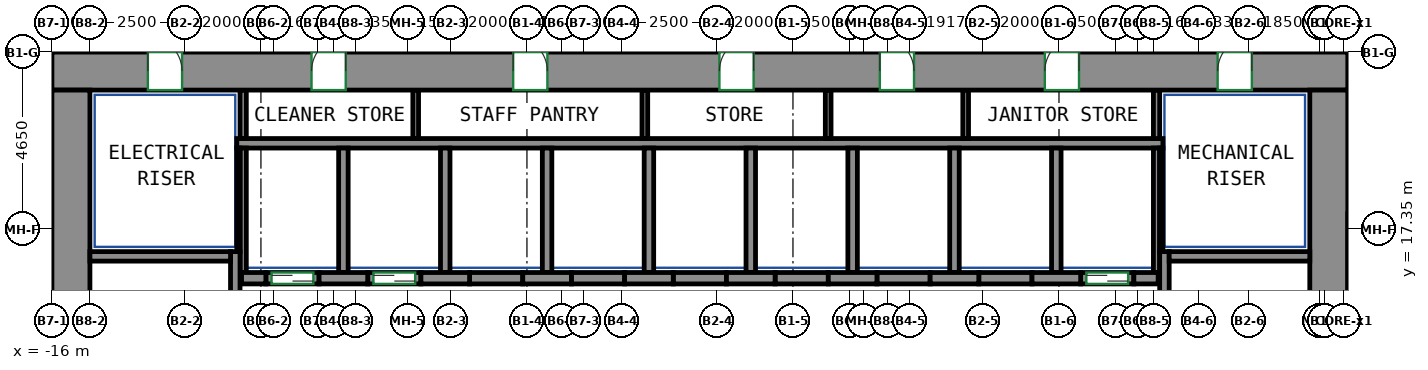
"""IFC4 building model, lengths in metres.
Left out: names, types, materials, properties, quantities, classifications, styles, units other than length and angle.
Written with IfcOpenShell. Run it as: python <this file> out.ifc"""

import sys

from ifc_helpers import new_model, si_unit, direction, frame, frame_2d, origin, place, context, subcontext, project, spatial, rectangle, extrude, source, transform, mapped, element, fill, save


model = new_model("IFC4")
c1 = context("Model", 3, precision=1e-05, world=origin(), true_north=direction((0.0, 1.0)))
c2 = subcontext(c1, "Body", "Model", "MODEL_VIEW")
j1 = project(units=[si_unit("LENGTHUNIT", "METRE"), si_unit("PLANEANGLEUNIT", "RADIAN")], contexts=[c1])
p1 = place(None, origin())
s1 = spatial("IfcSite", under=j1, at=p1, CompositionType="ELEMENT")
p2 = place(p1, origin())
s2 = spatial("IfcBuilding", under=s1, at=p2, CompositionType="ELEMENT")
p3 = place(p2, frame((0.0, 0.0, 35.0)))
s3 = spatial("IfcBuildingStorey", under=s2, at=p3, CompositionType="ELEMENT", Elevation=35.0)
m1 = source(origin(), c2, "Body", "SweptSolid", [
    extrude(rectangle(XDim=34.1, YDim=1.0, at=frame_2d((17.05, 0.0))), origin(), (0.0, 0.0, 1.0), 3.72),
])
p4 = place(p3, frame((-16.0, 21.5, 0.0), z_axis=(0.0, 0.0, 1.0), x_axis=(1.0, 0.0, 0.0)))
e1 = element("IfcWall", 1, at=p4, inside=s3, PredefinedType="SHEAR", context=c2, shape_type="MappedRepresentation", body=[
    mapped(m1, transform((0.0, 0.0, 0.0))),
])
p5 = place(p4, frame((6.831, 0.0, 0.0)))
e2 = element("IfcOpeningElement", 2, at=p5, cuts=e1, PredefinedType="OPENING", context=c2, shape_type="SweptSolid", body=[
    extrude(rectangle(XDim=0.9, YDim=2.1, at=frame_2d((0.45, 1.05))), frame((0.0, 0.51, 0.0), z_axis=(0.0, -1.0, 0.0), x_axis=(1.0, 0.0, 0.0)), (0.0, 0.0, 1.0), 1.02),
])
p6 = place(p4, frame((12.138, 0.0, 0.0)))
e3 = element("IfcOpeningElement", 3, at=p6, cuts=e1, PredefinedType="OPENING", context=c2, shape_type="SweptSolid", body=[
    extrude(rectangle(XDim=0.9, YDim=2.1, at=frame_2d((0.45, 1.05))), frame((0.0, 0.51, 0.0), z_axis=(0.0, -1.0, 0.0), x_axis=(1.0, 0.0, 0.0)), (0.0, 0.0, 1.0), 1.02),
])
p7 = place(p4, frame((17.565, 0.0, 0.0)))
e4 = element("IfcOpeningElement", 4, at=p7, cuts=e1, PredefinedType="OPENING", context=c2, shape_type="SweptSolid", body=[
    extrude(rectangle(XDim=0.9, YDim=2.1, at=frame_2d((0.45, 1.05))), frame((0.0, 0.51, 0.0), z_axis=(0.0, -1.0, 0.0), x_axis=(1.0, 0.0, 0.0)), (0.0, 0.0, 1.0), 1.02),
])
p8 = place(p4, frame((21.786, 0.0, 0.0)))
e5 = element("IfcOpeningElement", 5, at=p8, cuts=e1, PredefinedType="OPENING", context=c2, shape_type="SweptSolid", body=[
    extrude(rectangle(XDim=0.9, YDim=2.1, at=frame_2d((0.45, 1.05))), frame((0.0, 0.51, 0.0), z_axis=(0.0, -1.0, 0.0), x_axis=(1.0, 0.0, 0.0)), (0.0, 0.0, 1.0), 1.02),
])
p9 = place(p4, frame((26.127, 0.0, 0.0)))
e6 = element("IfcOpeningElement", 6, at=p9, cuts=e1, PredefinedType="OPENING", context=c2, shape_type="SweptSolid", body=[
    extrude(rectangle(XDim=0.9, YDim=2.1, at=frame_2d((0.45, 1.05))), frame((0.0, 0.51, 0.0), z_axis=(0.0, -1.0, 0.0), x_axis=(1.0, 0.0, 0.0)), (0.0, 0.0, 1.0), 1.02),
])
p10 = place(p4, frame((2.525, 0.0, 0.0)))
e7 = element("IfcOpeningElement", 7, at=p10, cuts=e1, PredefinedType="OPENING", context=c2, shape_type="SweptSolid", body=[
    extrude(rectangle(XDim=0.9, YDim=2.1, at=frame_2d((0.45, 1.05))), frame((0.0, 0.51, 0.0), z_axis=(0.0, -1.0, 0.0), x_axis=(1.0, 0.0, 0.0)), (0.0, 0.0, 1.0), 1.02),
])
p11 = place(p4, frame((30.675, 0.0, 0.0)))
e8 = element("IfcOpeningElement", 8, at=p11, cuts=e1, PredefinedType="OPENING", context=c2, shape_type="SweptSolid", body=[
    extrude(rectangle(XDim=0.9, YDim=2.1, at=frame_2d((0.45, 1.05))), frame((0.0, 0.51, 0.0), z_axis=(0.0, -1.0, 0.0), x_axis=(1.0, 0.0, 0.0)), (0.0, 0.0, 1.0), 1.02),
])
m2 = source(origin(), c2, "Body", "SweptSolid", [
    extrude(rectangle(XDim=12.0, YDim=1.0, at=frame_2d((6.0, 0.0))), origin(), (0.0, 0.0, 1.0), 3.72),
])
for number, where, z_axis, x_axis in (
    (9, (-15.5, 9.0, 0.0), (0.0, 0.0, 1.0), (0.0, 1.0, 0.0)),
    (10, (17.6, 9.0, 0.0), (0.0, 0.0, 1.0), (0.0, 1.0, 0.0)),
):
    element("IfcWall", number, at=place(p3, frame(where, z_axis=z_axis, x_axis=x_axis)), inside=s3, PredefinedType="SHEAR", context=c2, shape_type="MappedRepresentation", body=[
        mapped(m2, transform((0.0, 0.0, 0.0))),
    ])
m3 = source(origin(), c2, "Body", "SweptSolid", [
    extrude(rectangle(XDim=7.75, YDim=0.25, at=frame_2d((3.875, 0.0))), origin(), (0.0, 0.0, 1.0), 3.72),
])
p12 = place(p3, frame((-11.175, 9.0, 0.0), z_axis=(0.0, 0.0, 1.0), x_axis=(0.0, 1.0, 0.0)))
e11 = element("IfcWall", 11, at=p12, inside=s3, PredefinedType="SHEAR", context=c2, shape_type="MappedRepresentation", body=[
    mapped(m3, transform((0.0, 0.0, 0.0))),
])
m4 = source(origin(), c2, "Body", "SweptSolid", [
    extrude(rectangle(XDim=3.7, YDim=0.25, at=frame_2d((1.85, 0.0))), origin(), (0.0, 0.0, 1.0), 3.72),
])
p13 = place(p3, frame((-15.0, 16.625, 0.0), z_axis=(0.0, 0.0, 1.0), x_axis=(1.0, 0.0, 0.0)))
e12 = element("IfcWall", 12, at=p13, inside=s3, PredefinedType="SHEAR", context=c2, shape_type="MappedRepresentation", body=[
    mapped(m4, transform((0.0, 0.0, 0.0))),
])
p14 = place(p3, frame((13.275, 9.0, 0.0), z_axis=(0.0, 0.0, 1.0), x_axis=(0.0, 1.0, 0.0)))
e13 = element("IfcWall", 13, at=p14, inside=s3, PredefinedType="SHEAR", context=c2, shape_type="MappedRepresentation", body=[
    mapped(m3, transform((0.0, 0.0, 0.0))),
])
m5 = source(origin(), c2, "Body", "SweptSolid", [
    extrude(rectangle(XDim=3.7, YDim=0.25, at=frame_2d((1.85, 0.0))), origin(), (0.0, 0.0, 1.0), 3.72),
])
p15 = place(p3, frame((13.4, 16.625, 0.0), z_axis=(0.0, 0.0, 1.0), x_axis=(1.0, 0.0, 0.0)))
e14 = element("IfcWall", 14, at=p15, inside=s3, PredefinedType="SHEAR", context=c2, shape_type="MappedRepresentation", body=[
    mapped(m5, transform((0.0, 0.0, 0.0))),
])
m6 = source(origin(), c2, "Body", "SweptSolid", [
    extrude(rectangle(XDim=0.64, YDim=0.3, at=frame_2d((0.32, 0.0))), origin(), (0.0, 0.0, 1.0), 3.72),
])
p16 = place(p3, frame((-11.01, 16.05, 0.0), z_axis=(0.0, 0.0, 1.0), x_axis=(1.0, 0.0, 0.0)))
e15 = element("IfcWall", 15, at=p16, inside=s3, PredefinedType="SHEAR", context=c2, shape_type="MappedRepresentation", body=[
    mapped(m6, transform((0.0, 0.0, 0.0))),
])
m7 = source(origin(), c2, "Body", "SweptSolid", [
    extrude(rectangle(XDim=1.28, YDim=0.3, at=frame_2d((0.64, 0.0))), origin(), (0.0, 0.0, 1.0), 3.72),
])
for number, where, z_axis, x_axis in (
    (16, (-8.97, 16.05, 0.0), (0.0, 0.0, 1.0), (1.0, 0.0, 0.0)),
    (17, (-6.29, 16.05, 0.0), (0.0, 0.0, 1.0), (1.0, 0.0, 0.0)),
    (18, (-3.61, 16.05, 0.0), (0.0, 0.0, 1.0), (1.0, 0.0, 0.0)),
    (19, (-0.93, 16.05, 0.0), (0.0, 0.0, 1.0), (1.0, 0.0, 0.0)),
    (20, (1.75, 16.05, 0.0), (0.0, 0.0, 1.0), (1.0, 0.0, 0.0)),
    (21, (4.43, 16.05, 0.0), (0.0, 0.0, 1.0), (1.0, 0.0, 0.0)),
):
    element("IfcWall", number, at=place(p3, frame(where, z_axis=z_axis, x_axis=x_axis)), inside=s3, PredefinedType="SHEAR", context=c2, shape_type="MappedRepresentation", body=[
        mapped(m7, transform((0.0, 0.0, 0.0))),
    ])
m8 = source(origin(), c2, "Body", "SweptSolid", [
    extrude(rectangle(XDim=1.28, YDim=0.3, at=frame_2d((0.64, 0.0))), origin(), (0.0, 0.0, 1.0), 3.72),
])
p17 = place(p3, frame((7.11, 16.05, 0.0), z_axis=(0.0, 0.0, 1.0), x_axis=(1.0, 0.0, 0.0)))
e22 = element("IfcWall", 22, at=p17, inside=s3, PredefinedType="SHEAR", context=c2, shape_type="MappedRepresentation", body=[
    mapped(m8, transform((0.0, 0.0, 0.0))),
])
p18 = place(p3, frame((9.79, 16.05, 0.0), z_axis=(0.0, 0.0, 1.0), x_axis=(1.0, 0.0, 0.0)))
e23 = element("IfcWall", 23, at=p18, inside=s3, PredefinedType="SHEAR", context=c2, shape_type="MappedRepresentation", body=[
    mapped(m7, transform((0.0, 0.0, 0.0))),
])
m9 = source(origin(), c2, "Body", "SweptSolid", [
    extrude(rectangle(XDim=0.64, YDim=0.3, at=frame_2d((0.32, 0.0))), origin(), (0.0, 0.0, 1.0), 3.72),
])
p19 = place(p3, frame((12.47, 16.05, 0.0), z_axis=(0.0, 0.0, 1.0), x_axis=(1.0, 0.0, 0.0)))
e24 = element("IfcWall", 24, at=p19, inside=s3, PredefinedType="SHEAR", context=c2, shape_type="MappedRepresentation", body=[
    mapped(m9, transform((0.0, 0.0, 0.0))),
])
m10 = source(origin(), c2, "Body", "SweptSolid", [
    extrude(rectangle(XDim=1.4, YDim=0.3, at=frame_2d((0.7, 0.0))), origin(), (0.0, 0.0, 1.0), 3.72),
])
p20 = place(p3, frame((11.07, 16.05, 0.0), z_axis=(0.0, 0.0, 1.0), x_axis=(1.0, 0.0, 0.0)))
e25 = element("IfcWall", 25, at=p20, inside=s3, PredefinedType="PARTITIONING", context=c2, shape_type="MappedRepresentation", body=[
    mapped(m10, transform((0.0, 0.0, 0.0))),
])
p21 = place(p20, frame((0.15, 0.0, 0.0)))
e26 = element("IfcOpeningElement", 26, at=p21, cuts=e25, PredefinedType="OPENING", context=c2, shape_type="SweptSolid", body=[
    extrude(rectangle(XDim=1.1, YDim=2.1, at=frame_2d((0.55, 1.05))), frame((0.0, 0.16, 0.0), z_axis=(0.0, -1.0, 0.0), x_axis=(1.0, 0.0, 0.0)), (0.0, 0.0, 1.0), 0.32),
])
m11 = source(origin(), c2, "Body", "SweptSolid", [
    extrude(rectangle(XDim=1.4, YDim=0.3, at=frame_2d((0.7, 0.0))), origin(), (0.0, 0.0, 1.0), 3.72),
])
p22 = place(p3, frame((-10.37, 16.05, 0.0), z_axis=(0.0, 0.0, 1.0), x_axis=(1.0, 0.0, 0.0)))
e27 = element("IfcWall", 27, at=p22, inside=s3, PredefinedType="PARTITIONING", context=c2, shape_type="MappedRepresentation", body=[
    mapped(m11, transform((0.0, 0.0, 0.0))),
])
p23 = place(p22, frame((0.15, 0.0, 0.0)))
e28 = element("IfcOpeningElement", 28, at=p23, cuts=e27, PredefinedType="OPENING", context=c2, shape_type="SweptSolid", body=[
    extrude(rectangle(XDim=1.1, YDim=2.1, at=frame_2d((0.55, 1.05))), frame((0.0, 0.16, 0.0), z_axis=(0.0, -1.0, 0.0), x_axis=(1.0, 0.0, 0.0)), (0.0, 0.0, 1.0), 0.32),
])
p24 = place(p3, frame((-7.69, 16.05, 0.0), z_axis=(0.0, 0.0, 1.0), x_axis=(1.0, 0.0, 0.0)))
e29 = element("IfcWall", 29, at=p24, inside=s3, PredefinedType="PARTITIONING", context=c2, shape_type="MappedRepresentation", body=[
    mapped(m10, transform((0.0, 0.0, 0.0))),
])
p25 = place(p24, frame((0.15, 0.0, 0.0)))
e30 = element("IfcOpeningElement", 30, at=p25, cuts=e29, PredefinedType="OPENING", context=c2, shape_type="SweptSolid", body=[
    extrude(rectangle(XDim=1.1, YDim=2.1, at=frame_2d((0.55, 1.05))), frame((0.0, 0.16, 0.0), z_axis=(0.0, -1.0, 0.0), x_axis=(1.0, 0.0, 0.0)), (0.0, 0.0, 1.0), 0.32),
])
p26 = place(p3, frame((-5.01, 16.05, 0.0), z_axis=(0.0, 0.0, 1.0), x_axis=(1.0, 0.0, 0.0)))
e31 = element("IfcWall", 31, at=p26, inside=s3, PredefinedType="PARTITIONING", context=c2, shape_type="MappedRepresentation", body=[
    mapped(m10, transform((0.0, 0.0, 0.0))),
])
p27 = place(p3, frame((-2.33, 16.05, 0.0), z_axis=(0.0, 0.0, 1.0), x_axis=(1.0, 0.0, 0.0)))
e32 = element("IfcWall", 32, at=p27, inside=s3, PredefinedType="PARTITIONING", context=c2, shape_type="MappedRepresentation", body=[
    mapped(m11, transform((0.0, 0.0, 0.0))),
])
for number, where, z_axis, x_axis in (
    (33, (0.35, 16.05, 0.0), (0.0, 0.0, 1.0), (1.0, 0.0, 0.0)),
    (34, (3.03, 16.05, 0.0), (0.0, 0.0, 1.0), (1.0, 0.0, 0.0)),
):
    element("IfcWall", number, at=place(p3, frame(where, z_axis=z_axis, x_axis=x_axis)), inside=s3, PredefinedType="PARTITIONING", context=c2, shape_type="MappedRepresentation", body=[
        mapped(m10, transform((0.0, 0.0, 0.0))),
    ])
for number, where, z_axis, x_axis in (
    (35, (5.71, 16.05, 0.0), (0.0, 0.0, 1.0), (1.0, 0.0, 0.0)),
    (36, (8.39, 16.05, 0.0), (0.0, 0.0, 1.0), (1.0, 0.0, 0.0)),
):
    element("IfcWall", number, at=place(p3, frame(where, z_axis=z_axis, x_axis=x_axis)), inside=s3, PredefinedType="PARTITIONING", context=c2, shape_type="MappedRepresentation", body=[
        mapped(m11, transform((0.0, 0.0, 0.0))),
    ])
m12 = source(origin(), c2, "Body", "SweptSolid", [
    extrude(rectangle(XDim=24.37, YDim=0.25, at=frame_2d((12.185, 0.0))), origin(), (0.0, 0.0, 1.0), 3.72),
])
p28 = place(p3, frame((-11.135, 19.6, 0.0), z_axis=(0.0, 0.0, 1.0), x_axis=(1.0, 0.0, 0.0)))
e37 = element("IfcWall", 37, at=p28, inside=s3, PredefinedType="PARTITIONING", context=c2, shape_type="MappedRepresentation", body=[
    mapped(m12, transform((0.0, 0.0, 0.0))),
])
m13 = source(origin(), c2, "Body", "SweptSolid", [
    extrude(rectangle(XDim=3.275, YDim=0.165, at=frame_2d((1.638, 0.0))), origin(), (0.0, 0.0, 1.0), 3.72),
])
p29 = place(p3, frame((13.067, 16.2, 0.0), z_axis=(0.0, 0.0, 1.0), x_axis=(0.0, 1.0, 0.0)))
e38 = element("IfcWall", 38, at=p29, inside=s3, PredefinedType="PARTITIONING", context=c2, shape_type="MappedRepresentation", body=[
    mapped(m13, transform((0.0, 0.0, 0.0))),
])
m14 = source(origin(), c2, "Body", "SweptSolid", [
    extrude(rectangle(XDim=1.275, YDim=0.165, at=frame_2d((0.637, 0.0))), origin(), (0.0, 0.0, 1.0), 3.72),
])
p30 = place(p3, frame((13.067, 19.725, 0.0), z_axis=(0.0, 0.0, 1.0), x_axis=(0.0, 1.0, 0.0)))
e39 = element("IfcWall", 39, at=p30, inside=s3, PredefinedType="PARTITIONING", context=c2, shape_type="MappedRepresentation", body=[
    mapped(m14, transform((0.0, 0.0, 0.0))),
])
p31 = place(p3, frame((-10.968, 16.2, 0.0), z_axis=(0.0, 0.0, 1.0), x_axis=(0.0, 1.0, 0.0)))
e40 = element("IfcWall", 40, at=p31, inside=s3, PredefinedType="PARTITIONING", context=c2, shape_type="MappedRepresentation", body=[
    mapped(m13, transform((0.0, 0.0, 0.0))),
])
p32 = place(p3, frame((-10.968, 19.725, 0.0), z_axis=(0.0, 0.0, 1.0), x_axis=(0.0, 1.0, 0.0)))
e41 = element("IfcWall", 41, at=p32, inside=s3, PredefinedType="PARTITIONING", context=c2, shape_type="MappedRepresentation", body=[
    mapped(m14, transform((0.0, 0.0, 0.0))),
])
m15 = source(origin(), c2, "Body", "SweptSolid", [
    extrude(rectangle(XDim=3.275, YDim=0.25, at=frame_2d((1.638, 0.0))), origin(), (0.0, 0.0, 1.0), 3.72),
])
p33 = place(p3, frame((10.43, 16.2, 0.0), z_axis=(0.0, 0.0, 1.0), x_axis=(0.0, 1.0, 0.0)))
e42 = element("IfcWall", 42, at=p33, inside=s3, PredefinedType="PARTITIONING", context=c2, shape_type="MappedRepresentation", body=[
    mapped(m15, transform((0.0, 0.0, 0.0))),
])
m16 = source(origin(), c2, "Body", "SweptSolid", [
    extrude(rectangle(XDim=2.725, YDim=0.085, at=frame_2d((1.363, 0.0))), origin(), (0.0, 0.0, 1.0), 3.72),
])
p34 = place(p3, frame((13.192, 16.75, 0.0), z_axis=(0.0, 0.0, 1.0), x_axis=(0.0, 1.0, 0.0)))
e43 = element("IfcWall", 43, at=p34, inside=s3, PredefinedType="PARTITIONING", context=c2, shape_type="MappedRepresentation", body=[
    mapped(m16, transform((0.0, 0.0, 0.0))),
])
for number, where, z_axis, x_axis in (
    (44, (2.39, 16.2, 0.0), (0.0, 0.0, 1.0), (0.0, 1.0, 0.0)),
    (45, (5.07, 16.2, 0.0), (0.0, 0.0, 1.0), (0.0, 1.0, 0.0)),
    (46, (7.75, 16.2, 0.0), (0.0, 0.0, 1.0), (0.0, 1.0, 0.0)),
    (47, (-0.29, 16.2, 0.0), (0.0, 0.0, 1.0), (0.0, 1.0, 0.0)),
):
    element("IfcWall", number, at=place(p3, frame(where, z_axis=z_axis, x_axis=x_axis)), inside=s3, PredefinedType="PARTITIONING", context=c2, shape_type="MappedRepresentation", body=[
        mapped(m15, transform((0.0, 0.0, 0.0))),
    ])
p35 = place(p3, frame((-11.093, 16.75, 0.0), z_axis=(0.0, 0.0, 1.0), x_axis=(0.0, 1.0, 0.0)))
e48 = element("IfcWall", 48, at=p35, inside=s3, PredefinedType="PARTITIONING", context=c2, shape_type="MappedRepresentation", body=[
    mapped(m16, transform((0.0, 0.0, 0.0))),
])
for number, where, z_axis, x_axis in (
    (49, (-2.97, 16.2, 0.0), (0.0, 0.0, 1.0), (0.0, 1.0, 0.0)),
    (50, (-5.65, 16.2, 0.0), (0.0, 0.0, 1.0), (0.0, 1.0, 0.0)),
    (51, (-8.33, 16.2, 0.0), (0.0, 0.0, 1.0), (0.0, 1.0, 0.0)),
):
    element("IfcWall", number, at=place(p3, frame(where, z_axis=z_axis, x_axis=x_axis)), inside=s3, PredefinedType="PARTITIONING", context=c2, shape_type="MappedRepresentation", body=[
        mapped(m15, transform((0.0, 0.0, 0.0))),
    ])
m17 = source(origin(), c2, "Body", "SweptSolid", [
    extrude(rectangle(XDim=1.275, YDim=0.15, at=frame_2d((0.637, 0.0))), origin(), (0.0, 0.0, 1.0), 3.72),
])
for number, where, z_axis, x_axis in (
    (52, (-6.427, 19.725, 0.0), (0.0, 0.0, 1.0), (0.0, 1.0, 0.0)),
    (53, (-0.397, 19.725, 0.0), (0.0, 0.0, 1.0), (0.0, 1.0, 0.0)),
    (54, (4.427, 19.725, 0.0), (0.0, 0.0, 1.0), (0.0, 1.0, 0.0)),
    (55, (8.045, 19.725, 0.0), (0.0, 0.0, 1.0), (0.0, 1.0, 0.0)),
):
    element("IfcWall", number, at=place(p3, frame(where, z_axis=z_axis, x_axis=x_axis)), inside=s3, PredefinedType="PARTITIONING", context=c2, shape_type="MappedRepresentation", body=[
        mapped(m17, transform((0.0, 0.0, 0.0))),
    ])
p36 = place(p21, origin())
e56 = element("IfcDoor", 56, at=p36, inside=s3, OperationType="DOUBLE_DOOR_SLIDING", PredefinedType="DOOR", context=c2, shape_type="SweptSolid", body=[
    extrude(rectangle(XDim=1.1, YDim=2.1, at=frame_2d((0.55, 1.05))), frame((0.0, 0.025, 0.0), z_axis=(0.0, -1.0, 0.0), x_axis=(1.0, 0.0, 0.0)), (0.0, 0.0, 1.0), 0.05),
])
fill(e26, e56)
p37 = place(p23, origin())
e57 = element("IfcDoor", 57, at=p37, inside=s3, OperationType="DOUBLE_DOOR_SLIDING", PredefinedType="DOOR", context=c2, shape_type="SweptSolid", body=[
    extrude(rectangle(XDim=1.1, YDim=2.1, at=frame_2d((0.55, 1.05))), frame((0.0, 0.025, 0.0), z_axis=(0.0, -1.0, 0.0), x_axis=(1.0, 0.0, 0.0)), (0.0, 0.0, 1.0), 0.05),
])
fill(e28, e57)
p38 = place(p25, origin())
e58 = element("IfcDoor", 58, at=p38, inside=s3, OperationType="DOUBLE_DOOR_SLIDING", PredefinedType="DOOR", context=c2, shape_type="SweptSolid", body=[
    extrude(rectangle(XDim=1.1, YDim=2.1, at=frame_2d((0.55, 1.05))), frame((0.0, 0.025, 0.0), z_axis=(0.0, -1.0, 0.0), x_axis=(1.0, 0.0, 0.0)), (0.0, 0.0, 1.0), 0.05),
])
fill(e30, e58)
p39 = place(p5, origin())
e59 = element("IfcDoor", 59, at=p39, inside=s3, OperationType="SINGLE_SWING_RIGHT", PredefinedType="DOOR", context=c2, shape_type="SweptSolid", body=[
    extrude(rectangle(XDim=0.9, YDim=2.1, at=frame_2d((0.45, 1.05))), frame((0.0, -0.355, 0.0), z_axis=(0.0, -1.0, 0.0), x_axis=(1.0, 0.0, 0.0)), (0.0, 0.0, 1.0), 0.05),
])
fill(e2, e59)
p40 = place(p6, origin())
e60 = element("IfcDoor", 60, at=p40, inside=s3, OperationType="SINGLE_SWING_LEFT", PredefinedType="DOOR", context=c2, shape_type="SweptSolid", body=[
    extrude(rectangle(XDim=0.9, YDim=2.1, at=frame_2d((0.45, 1.05))), frame((0.0, -0.355, 0.0), z_axis=(0.0, -1.0, 0.0), x_axis=(1.0, 0.0, 0.0)), (0.0, 0.0, 1.0), 0.05),
])
fill(e3, e60)
p41 = place(p7, origin())
e61 = element("IfcDoor", 61, at=p41, inside=s3, OperationType="SINGLE_SWING_RIGHT", PredefinedType="DOOR", context=c2, shape_type="SweptSolid", body=[
    extrude(rectangle(XDim=0.9, YDim=2.1, at=frame_2d((0.45, 1.05))), frame((0.0, -0.355, 0.0), z_axis=(0.0, -1.0, 0.0), x_axis=(1.0, 0.0, 0.0)), (0.0, 0.0, 1.0), 0.05),
])
fill(e4, e61)
p42 = place(p8, origin())
e62 = element("IfcDoor", 62, at=p42, inside=s3, OperationType="SINGLE_SWING_LEFT", PredefinedType="DOOR", context=c2, shape_type="SweptSolid", body=[
    extrude(rectangle(XDim=0.9, YDim=2.1, at=frame_2d((0.45, 1.05))), frame((0.0, -0.355, 0.0), z_axis=(0.0, -1.0, 0.0), x_axis=(1.0, 0.0, 0.0)), (0.0, 0.0, 1.0), 0.05),
])
fill(e5, e62)
p43 = place(p9, origin())
e63 = element("IfcDoor", 63, at=p43, inside=s3, OperationType="SINGLE_SWING_RIGHT", PredefinedType="DOOR", context=c2, shape_type="SweptSolid", body=[
    extrude(rectangle(XDim=0.9, YDim=2.1, at=frame_2d((0.45, 1.05))), frame((0.0, -0.355, 0.0), z_axis=(0.0, -1.0, 0.0), x_axis=(1.0, 0.0, 0.0)), (0.0, 0.0, 1.0), 0.05),
])
fill(e6, e63)
p44 = place(p10, origin())
e64 = element("IfcDoor", 64, at=p44, inside=s3, OperationType="SINGLE_SWING_LEFT", PredefinedType="DOOR", context=c2, shape_type="SweptSolid", body=[
    extrude(rectangle(XDim=0.9, YDim=2.1, at=frame_2d((0.45, 1.05))), frame((0.0, -0.355, 0.0), z_axis=(0.0, -1.0, 0.0), x_axis=(1.0, 0.0, 0.0)), (0.0, 0.0, 1.0), 0.05),
])
fill(e7, e64)
p45 = place(p11, origin())
e65 = element("IfcDoor", 65, at=p45, inside=s3, OperationType="SINGLE_SWING_RIGHT", PredefinedType="DOOR", context=c2, shape_type="SweptSolid", body=[
    extrude(rectangle(XDim=0.9, YDim=2.1, at=frame_2d((0.45, 1.05))), frame((0.0, -0.355, 0.0), z_axis=(0.0, -1.0, 0.0), x_axis=(1.0, 0.0, 0.0)), (0.0, 0.0, 1.0), 0.05),
])
fill(e8, e65)
save(model, sys.argv[1])
